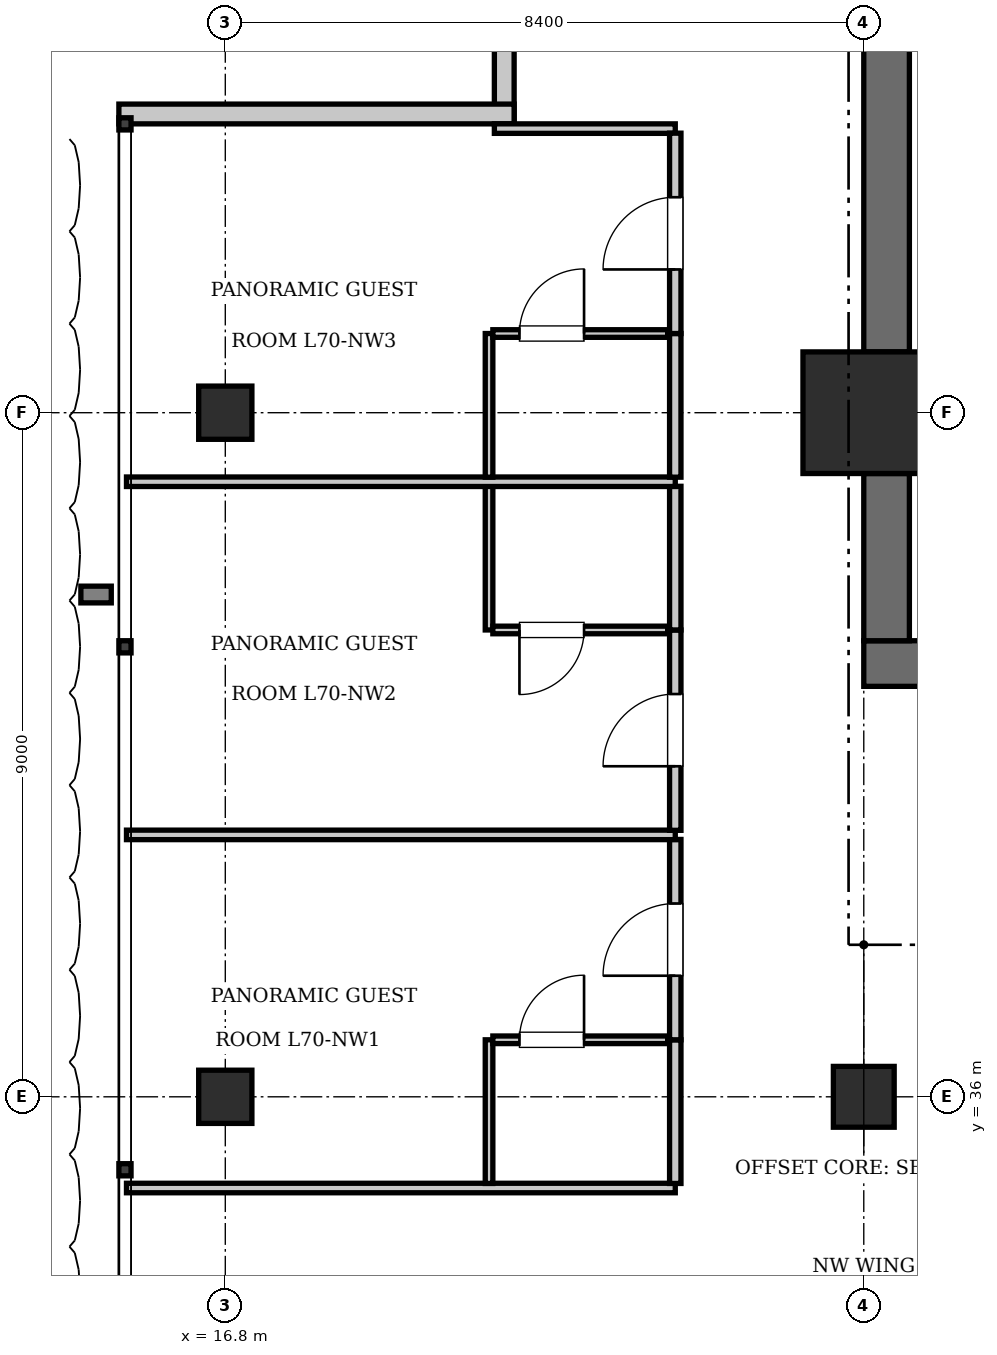
"""IFC4 building model, lengths in metres.
Left out: names, types, materials, properties, quantities, classifications, styles, units other than length and angle.
Written with IfcOpenShell. Run it as: python <this file> out.ifc"""

import sys

from ifc_helpers import new_model, si_unit, direction, frame, frame_2d, origin, origin_2d, place, context, subcontext, project, spatial, rectangle, extrude, element, fill, save


model = new_model("IFC4")
c1 = context("Model", 3, precision=1e-05, world=origin(), true_north=direction((0.0, 1.0)))
c2 = subcontext(c1, "Body", "Model", "MODEL_VIEW")
j1 = project(units=[si_unit("LENGTHUNIT", "METRE"), si_unit("PLANEANGLEUNIT", "RADIAN")], contexts=[c1])
p1 = place(None, origin())
s1 = spatial("IfcSite", under=j1, at=p1, CompositionType="ELEMENT")
p2 = place(p1, origin())
s2 = spatial("IfcBuilding", under=s1, at=p2, CompositionType="ELEMENT")
p3 = place(p2, frame((0.0, 0.0, 285.6)))
s3 = spatial("IfcBuildingStorey", under=s2, at=p3, CompositionType="ELEMENT", Elevation=285.6)
p4 = place(p3, frame((25.2, 45.0, 0.0), z_axis=(0.0, 0.0, 1.0), x_axis=(1.0, 0.0, 0.0)))
e1 = element("IfcColumn", 1, at=p4, inside=s3, PredefinedType="COLUMN", context=c2, shape_type="SweptSolid", body=[
    extrude(rectangle(XDim=1.6, YDim=1.6, at=origin_2d()), origin(), (0.0, 0.0, 1.0), 3.85),
])
p5 = place(p3, frame((25.2, 41.7, 0.0), z_axis=(0.0, 0.0, 1.0), x_axis=(1.0, 0.0, 0.0)))
e2 = element("IfcWall", 2, at=p5, inside=s3, PredefinedType="SHEAR", context=c2, shape_type="SweptSolid", body=[
    extrude(rectangle(XDim=6.8, YDim=0.6, at=frame_2d((3.4, 0.0))), origin(), (0.0, 0.0, 1.0), 3.85),
])
p6 = place(p5, frame((1.65, 0.0, 0.0)))
e3 = element("IfcOpeningElement", 3, at=p6, cuts=e2, PredefinedType="OPENING", context=c2, shape_type="SweptSolid", body=[
    extrude(rectangle(XDim=1.15, YDim=2.15, at=frame_2d((0.575, 1.075))), frame((0.0, 0.31, 0.0), z_axis=(0.0, -1.0, 0.0), x_axis=(1.0, 0.0, 0.0)), (0.0, 0.0, 1.0), 0.62),
])
p7 = place(p5, frame((5.15, 0.0, 0.0)))
e4 = element("IfcOpeningElement", 4, at=p7, cuts=e2, PredefinedType="OPENING", context=c2, shape_type="SweptSolid", body=[
    extrude(rectangle(XDim=1.1, YDim=2.2, at=frame_2d((0.55, 1.1))), frame((0.0, 0.31, 0.0), z_axis=(0.0, -1.0, 0.0), x_axis=(1.0, 0.0, 0.0)), (0.0, 0.0, 1.0), 0.62),
])
p8 = place(p3, frame((25.5, 42.0, 0.0), z_axis=(0.0, 0.0, 1.0), x_axis=(0.0, 1.0, 0.0)))
e5 = element("IfcWall", 5, at=p8, inside=s3, PredefinedType="SHEAR", context=c2, shape_type="SweptSolid", body=[
    extrude(rectangle(XDim=2.2, YDim=0.6, at=frame_2d((1.1, 0.0))), origin(), (0.0, 0.0, 1.0), 3.85),
])
p9 = place(p3, frame((25.5, 45.8, 0.0), z_axis=(0.0, 0.0, 1.0), x_axis=(0.0, 1.0, 0.0)))
e6 = element("IfcWall", 6, at=p9, inside=s3, PredefinedType="SHEAR", context=c2, shape_type="SweptSolid", body=[
    extrude(rectangle(XDim=7.6, YDim=0.6, at=frame_2d((3.8, 0.0))), origin(), (0.0, 0.0, 1.0), 3.85),
])
p10 = place(p3, frame((25.2, 36.0, 0.0), z_axis=(0.0, 0.0, 1.0), x_axis=(1.0, 0.0, 0.0)))
e7 = element("IfcColumn", 7, at=p10, inside=s3, PredefinedType="COLUMN", context=c2, shape_type="SweptSolid", body=[
    extrude(rectangle(XDim=0.8, YDim=0.8, at=origin_2d()), origin(), (0.0, 0.0, 1.0), 3.85),
])
for number, where, z_axis, x_axis in (
    (8, (16.8, 36.0, 0.0), (0.0, 0.0, 1.0), (1.0, 0.0, 0.0)),
    (9, (16.8, 45.0, 0.0), (0.0, 0.0, 1.0), (1.0, 0.0, 0.0)),
):
    element("IfcColumn", number, at=place(p3, frame(where, z_axis=z_axis, x_axis=x_axis)), inside=s3, PredefinedType="COLUMN", context=c2, shape_type="SweptSolid", body=[
        extrude(rectangle(XDim=0.7, YDim=0.7, at=origin_2d()), origin(), (0.0, 0.0, 1.0), 3.85),
    ])
p11 = place(p3, frame((20.47, 48.8, 0.0), z_axis=(0.0, 0.0, 1.0), x_axis=(0.0, 1.0, 0.0)))
e10 = element("IfcWall", 10, at=p11, inside=s3, PredefinedType="SOLIDWALL", context=c2, shape_type="SweptSolid", body=[
    extrude(rectangle(XDim=5.2, YDim=0.26, at=frame_2d((2.6, 0.0))), origin(), (0.0, 0.0, 1.0), 3.61),
])
p12 = place(p3, frame((15.4, 48.93, 0.0), z_axis=(0.0, 0.0, 1.0), x_axis=(1.0, 0.0, 0.0)))
e11 = element("IfcWall", 11, at=p12, inside=s3, PredefinedType="SOLIDWALL", context=c2, shape_type="SweptSolid", body=[
    extrude(rectangle(XDim=5.2, YDim=0.26, at=frame_2d((2.6, 0.0))), origin(), (0.0, 0.0, 1.0), 3.61),
])
p13 = place(p3, frame((15.5, 34.8, 0.0), z_axis=(0.0, 0.0, 1.0), x_axis=(1.0, 0.0, 0.0)))
e12 = element("IfcWall", 12, at=p13, inside=s3, PredefinedType="PARTITIONING", context=c2, shape_type="SweptSolid", body=[
    extrude(rectangle(XDim=7.22, YDim=0.125, at=frame_2d((3.61, 0.0))), origin(), (0.0, 0.0, 1.0), 3.61),
])
p14 = place(p3, frame((20.34, 48.738, 0.0), z_axis=(0.0, 0.0, 1.0), x_axis=(1.0, 0.0, 0.0)))
e13 = element("IfcWall", 13, at=p14, inside=s3, PredefinedType="PARTITIONING", context=c2, shape_type="SweptSolid", body=[
    extrude(rectangle(XDim=2.38, YDim=0.125, at=frame_2d((1.19, 0.0))), origin(), (0.0, 0.0, 1.0), 3.61),
])
p15 = place(p3, frame((22.72, 34.86, 0.0), z_axis=(0.0, 0.0, 1.0), x_axis=(0.0, 1.0, 0.0)))
e14 = element("IfcWall", 14, at=p15, inside=s3, PredefinedType="PARTITIONING", context=c2, shape_type="SweptSolid", body=[
    extrude(rectangle(XDim=1.89, YDim=0.15, at=frame_2d((0.945, 0.0))), origin(), (0.0, 0.0, 1.0), 3.61),
])
p16 = place(p3, frame((22.72, 36.75, 0.0), z_axis=(0.0, 0.0, 1.0), x_axis=(0.0, 1.0, 0.0)))
e15 = element("IfcWall", 15, at=p16, inside=s3, PredefinedType="PARTITIONING", context=c2, shape_type="SweptSolid", body=[
    extrude(rectangle(XDim=2.636, YDim=0.15, at=frame_2d((1.318, 0.0))), origin(), (0.0, 0.0, 1.0), 3.61),
])
p17 = place(p16, frame((0.843, 0.0, 0.0)))
e16 = element("IfcOpeningElement", 16, at=p17, cuts=e15, PredefinedType="OPENING", context=c2, shape_type="SweptSolid", body=[
    extrude(rectangle(XDim=0.95, YDim=2.15, at=frame_2d((0.475, 1.075))), frame((0.0, 0.085, 0.0), z_axis=(0.0, -1.0, 0.0), x_axis=(1.0, 0.0, 0.0)), (0.0, 0.0, 1.0), 0.17),
])
p18 = place(p3, frame((20.27, 34.86, 0.0), z_axis=(0.0, 0.0, 1.0), x_axis=(0.0, 1.0, 0.0)))
e17 = element("IfcWall", 17, at=p18, inside=s3, PredefinedType="PARTITIONING", context=c2, shape_type="SweptSolid", body=[
    extrude(rectangle(XDim=1.89, YDim=0.1, at=frame_2d((0.945, 0.0))), origin(), (0.0, 0.0, 1.0), 3.61),
])
p19 = place(p3, frame((20.32, 36.75, 0.0), z_axis=(0.0, 0.0, 1.0), x_axis=(1.0, 0.0, 0.0)))
e18 = element("IfcWall", 18, at=p19, inside=s3, PredefinedType="PARTITIONING", context=c2, shape_type="SweptSolid", body=[
    extrude(rectangle(XDim=2.3, YDim=0.1, at=frame_2d((1.15, 0.0))), origin(), (0.0, 0.0, 1.0), 3.61),
])
p20 = place(p19, frame((0.35, 0.0, 0.0)))
e19 = element("IfcOpeningElement", 19, at=p20, cuts=e18, PredefinedType="OPENING", context=c2, shape_type="SweptSolid", body=[
    extrude(rectangle(XDim=0.85, YDim=2.1, at=frame_2d((0.425, 1.05))), frame((0.0, 0.06, 0.0), z_axis=(0.0, -1.0, 0.0), x_axis=(1.0, 0.0, 0.0)), (0.0, 0.0, 1.0), 0.12),
])
p21 = place(p3, frame((15.5, 39.446, 0.0), z_axis=(0.0, 0.0, 1.0), x_axis=(1.0, 0.0, 0.0)))
e20 = element("IfcWall", 20, at=p21, inside=s3, PredefinedType="PARTITIONING", context=c2, shape_type="SweptSolid", body=[
    extrude(rectangle(XDim=7.22, YDim=0.125, at=frame_2d((3.61, 0.0))), origin(), (0.0, 0.0, 1.0), 3.61),
])
p22 = place(p3, frame((22.72, 39.506, 0.0), z_axis=(0.0, 0.0, 1.0), x_axis=(0.0, 1.0, 0.0)))
e21 = element("IfcWall", 21, at=p22, inside=s3, PredefinedType="PARTITIONING", context=c2, shape_type="SweptSolid", body=[
    extrude(rectangle(XDim=2.636, YDim=0.15, at=frame_2d((1.318, 0.0))), origin(), (0.0, 0.0, 1.0), 3.61),
])
p23 = place(p22, frame((0.843, 0.0, 0.0)))
e22 = element("IfcOpeningElement", 22, at=p23, cuts=e21, PredefinedType="OPENING", context=c2, shape_type="SweptSolid", body=[
    extrude(rectangle(XDim=0.95, YDim=2.15, at=frame_2d((0.475, 1.075))), frame((0.0, 0.085, 0.0), z_axis=(0.0, -1.0, 0.0), x_axis=(1.0, 0.0, 0.0)), (0.0, 0.0, 1.0), 0.17),
])
p24 = place(p3, frame((22.72, 42.142, 0.0), z_axis=(0.0, 0.0, 1.0), x_axis=(0.0, 1.0, 0.0)))
e23 = element("IfcWall", 23, at=p24, inside=s3, PredefinedType="PARTITIONING", context=c2, shape_type="SweptSolid", body=[
    extrude(rectangle(XDim=1.89, YDim=0.15, at=frame_2d((0.945, 0.0))), origin(), (0.0, 0.0, 1.0), 3.61),
])
p25 = place(p3, frame((20.27, 42.142, 0.0), z_axis=(0.0, 0.0, 1.0), x_axis=(0.0, 1.0, 0.0)))
e24 = element("IfcWall", 24, at=p25, inside=s3, PredefinedType="PARTITIONING", context=c2, shape_type="SweptSolid", body=[
    extrude(rectangle(XDim=1.89, YDim=0.1, at=frame_2d((0.945, 0.0))), origin(), (0.0, 0.0, 1.0), 3.61),
])
p26 = place(p3, frame((20.32, 42.142, 0.0), z_axis=(0.0, 0.0, 1.0), x_axis=(1.0, 0.0, 0.0)))
e25 = element("IfcWall", 25, at=p26, inside=s3, PredefinedType="PARTITIONING", context=c2, shape_type="SweptSolid", body=[
    extrude(rectangle(XDim=2.3, YDim=0.1, at=frame_2d((1.15, 0.0))), origin(), (0.0, 0.0, 1.0), 3.61),
])
p27 = place(p26, frame((0.35, 0.0, 0.0)))
e26 = element("IfcOpeningElement", 26, at=p27, cuts=e25, PredefinedType="OPENING", context=c2, shape_type="SweptSolid", body=[
    extrude(rectangle(XDim=0.85, YDim=2.1, at=frame_2d((0.425, 1.05))), frame((0.0, 0.06, 0.0), z_axis=(0.0, -1.0, 0.0), x_axis=(1.0, 0.0, 0.0)), (0.0, 0.0, 1.0), 0.12),
])
p28 = place(p3, frame((15.5, 44.092, 0.0), z_axis=(0.0, 0.0, 1.0), x_axis=(1.0, 0.0, 0.0)))
e27 = element("IfcWall", 27, at=p28, inside=s3, PredefinedType="PARTITIONING", context=c2, shape_type="SweptSolid", body=[
    extrude(rectangle(XDim=7.22, YDim=0.125, at=frame_2d((3.61, 0.0))), origin(), (0.0, 0.0, 1.0), 3.61),
])
p29 = place(p3, frame((22.72, 44.152, 0.0), z_axis=(0.0, 0.0, 1.0), x_axis=(0.0, 1.0, 0.0)))
e28 = element("IfcWall", 28, at=p29, inside=s3, PredefinedType="PARTITIONING", context=c2, shape_type="SweptSolid", body=[
    extrude(rectangle(XDim=1.89, YDim=0.15, at=frame_2d((0.945, 0.0))), origin(), (0.0, 0.0, 1.0), 3.61),
])
p30 = place(p3, frame((22.72, 46.042, 0.0), z_axis=(0.0, 0.0, 1.0), x_axis=(0.0, 1.0, 0.0)))
e29 = element("IfcWall", 29, at=p30, inside=s3, PredefinedType="PARTITIONING", context=c2, shape_type="SweptSolid", body=[
    extrude(rectangle(XDim=2.636, YDim=0.15, at=frame_2d((1.318, 0.0))), origin(), (0.0, 0.0, 1.0), 3.61),
])
p31 = place(p30, frame((0.843, 0.0, 0.0)))
e30 = element("IfcOpeningElement", 30, at=p31, cuts=e29, PredefinedType="OPENING", context=c2, shape_type="SweptSolid", body=[
    extrude(rectangle(XDim=0.95, YDim=2.15, at=frame_2d((0.475, 1.075))), frame((0.0, 0.085, 0.0), z_axis=(0.0, -1.0, 0.0), x_axis=(1.0, 0.0, 0.0)), (0.0, 0.0, 1.0), 0.17),
])
p32 = place(p3, frame((20.27, 44.152, 0.0), z_axis=(0.0, 0.0, 1.0), x_axis=(0.0, 1.0, 0.0)))
e31 = element("IfcWall", 31, at=p32, inside=s3, PredefinedType="PARTITIONING", context=c2, shape_type="SweptSolid", body=[
    extrude(rectangle(XDim=1.89, YDim=0.1, at=frame_2d((0.945, 0.0))), origin(), (0.0, 0.0, 1.0), 3.61),
])
p33 = place(p3, frame((20.32, 46.042, 0.0), z_axis=(0.0, 0.0, 1.0), x_axis=(1.0, 0.0, 0.0)))
e32 = element("IfcWall", 32, at=p33, inside=s3, PredefinedType="PARTITIONING", context=c2, shape_type="SweptSolid", body=[
    extrude(rectangle(XDim=2.3, YDim=0.1, at=frame_2d((1.15, 0.0))), origin(), (0.0, 0.0, 1.0), 3.61),
])
p34 = place(p33, frame((0.35, 0.0, 0.0)))
e33 = element("IfcOpeningElement", 33, at=p34, cuts=e32, PredefinedType="OPENING", context=c2, shape_type="SweptSolid", body=[
    extrude(rectangle(XDim=0.85, YDim=2.1, at=frame_2d((0.425, 1.05))), frame((0.0, 0.06, 0.0), z_axis=(0.0, -1.0, 0.0), x_axis=(1.0, 0.0, 0.0)), (0.0, 0.0, 1.0), 0.12),
])
p35 = place(p20, origin())
e34 = element("IfcDoor", 34, at=p35, inside=s3, OperationType="SINGLE_SWING_RIGHT", PredefinedType="DOOR", context=c2, shape_type="SweptSolid", body=[
    extrude(rectangle(XDim=0.85, YDim=2.1, at=frame_2d((0.425, 1.05))), frame((0.0, 0.025, 0.0), z_axis=(0.0, -1.0, 0.0), x_axis=(1.0, 0.0, 0.0)), (0.0, 0.0, 1.0), 0.05),
])
fill(e19, e34)
p36 = place(p17, origin())
e35 = element("IfcDoor", 35, at=p36, inside=s3, OperationType="SINGLE_SWING_LEFT", PredefinedType="DOOR", context=c2, shape_type="SweptSolid", body=[
    extrude(rectangle(XDim=0.95, YDim=2.15, at=frame_2d((0.475, 1.075))), frame((0.0, 0.025, 0.0), z_axis=(0.0, -1.0, 0.0), x_axis=(1.0, 0.0, 0.0)), (0.0, 0.0, 1.0), 0.05),
])
fill(e16, e35)
p37 = place(p27, frame((0.85, 0.0, 0.0), z_axis=(0.0, 0.0, 1.0), x_axis=(-1.0, 0.0, 0.0)))
e36 = element("IfcDoor", 36, at=p37, inside=s3, OperationType="SINGLE_SWING_RIGHT", PredefinedType="DOOR", context=c2, shape_type="SweptSolid", body=[
    extrude(rectangle(XDim=0.85, YDim=2.1, at=frame_2d((0.425, 1.05))), frame((0.0, 0.025, 0.0), z_axis=(0.0, -1.0, 0.0), x_axis=(1.0, 0.0, 0.0)), (0.0, 0.0, 1.0), 0.05),
])
fill(e26, e36)
p38 = place(p23, origin())
e37 = element("IfcDoor", 37, at=p38, inside=s3, OperationType="SINGLE_SWING_LEFT", PredefinedType="DOOR", context=c2, shape_type="SweptSolid", body=[
    extrude(rectangle(XDim=0.95, YDim=2.15, at=frame_2d((0.475, 1.075))), frame((0.0, 0.025, 0.0), z_axis=(0.0, -1.0, 0.0), x_axis=(1.0, 0.0, 0.0)), (0.0, 0.0, 1.0), 0.05),
])
fill(e22, e37)
p39 = place(p34, origin())
e38 = element("IfcDoor", 38, at=p39, inside=s3, OperationType="SINGLE_SWING_RIGHT", PredefinedType="DOOR", context=c2, shape_type="SweptSolid", body=[
    extrude(rectangle(XDim=0.85, YDim=2.1, at=frame_2d((0.425, 1.05))), frame((0.0, 0.025, 0.0), z_axis=(0.0, -1.0, 0.0), x_axis=(1.0, 0.0, 0.0)), (0.0, 0.0, 1.0), 0.05),
])
fill(e33, e38)
p40 = place(p31, origin())
e39 = element("IfcDoor", 39, at=p40, inside=s3, OperationType="SINGLE_SWING_LEFT", PredefinedType="DOOR", context=c2, shape_type="SweptSolid", body=[
    extrude(rectangle(XDim=0.95, YDim=2.15, at=frame_2d((0.475, 1.075))), frame((0.0, 0.025, 0.0), z_axis=(0.0, -1.0, 0.0), x_axis=(1.0, 0.0, 0.0)), (0.0, 0.0, 1.0), 0.05),
])
fill(e30, e39)
save(model, sys.argv[1])
